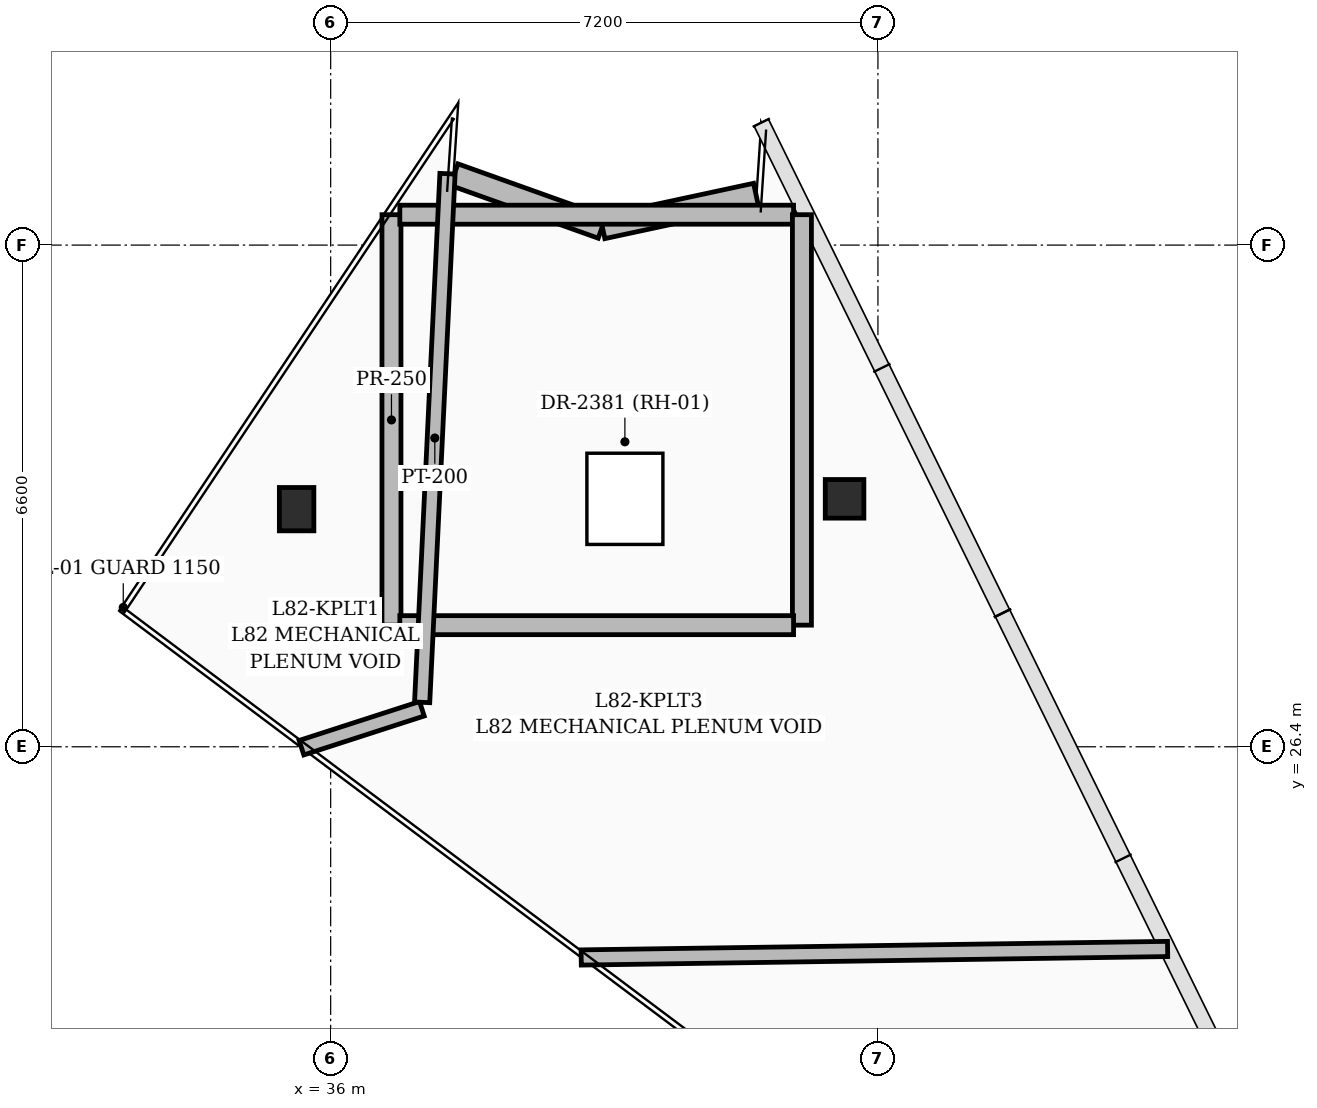
"""IFC4 building model, lengths in metres.
Left out: names, types, materials, properties, quantities, classifications, styles, units other than length and angle.
Written with IfcOpenShell. Run it as: python <this file> out.ifc"""

import sys

from ifc_helpers import new_model, si_unit, direction, frame, frame_2d, origin, origin_2d, place, context, subcontext, project, spatial, rectangle, hollow_circle, i_section, extrude, element, save


model = new_model("IFC4")
c1 = context("Model", 3, precision=1e-05, world=origin(), true_north=direction((0.0, 1.0)))
c2 = subcontext(c1, "Body", "Model", "MODEL_VIEW")
j1 = project(units=[si_unit("LENGTHUNIT", "METRE"), si_unit("PLANEANGLEUNIT", "RADIAN")], contexts=[c1])
p1 = place(None, origin())
s1 = spatial("IfcSite", under=j1, at=p1, CompositionType="ELEMENT")
p2 = place(p1, origin())
s2 = spatial("IfcBuilding", under=s1, at=p2, CompositionType="ELEMENT")
p3 = place(p2, frame((0.0, 0.0, 318.5)))
s3 = spatial("IfcBuildingStorey", under=s2, at=p3, CompositionType="ELEMENT", Elevation=318.5)
p4 = place(p3, frame((42.761, 29.662, 0.0), z_axis=(0.0, 0.0, 1.0), x_axis=(1.0, 0.0, 0.0)))
e1 = element("IfcColumn", 1, at=p4, inside=s3, PredefinedType="COLUMN", context=c2, shape_type="SweptSolid", body=[
    extrude(hollow_circle(Radius=0.254, WallThickness=0.016, at=origin_2d()), origin(), (0.0, 0.0, 1.0), 3.85),
])
p5 = place(p3, frame((35.552, 29.526, 0.0), z_axis=(0.0, 0.0, 1.0), x_axis=(1.0, 0.0, 0.0)))
e2 = element("IfcColumn", 2, at=p5, inside=s3, PredefinedType="COLUMN", context=c2, shape_type="SweptSolid", body=[
    extrude(i_section(OverallWidth=0.454, OverallDepth=0.57, WebThickness=0.078, FlangeThickness=0.094, FilletRadius=0.02, at=origin_2d()), origin(), (0.0, 0.0, 1.0), 2.823),
])
p6 = place(p3, frame((37.624, 33.927, 0.0), z_axis=(0.0, 0.0, 1.0), x_axis=(0.941672407687, -0.336530944493, 0.0)))
e3 = element("IfcWall", 3, at=p6, inside=s3, PredefinedType="SOLIDWALL", context=c2, shape_type="SweptSolid", body=[
    extrude(rectangle(XDim=2.067, YDim=0.3, at=frame_2d((1.033, 0.0))), origin(), (0.0, 0.0, 1.0), 3.6),
])
p7 = place(p3, frame((39.576, 33.232, 0.0), z_axis=(0.0, 0.0, 1.0), x_axis=(0.977608338725, 0.210432735227, 0.0)))
e4 = element("IfcWall", 4, at=p7, inside=s3, PredefinedType="SOLIDWALL", context=c2, shape_type="SweptSolid", body=[
    extrude(rectangle(XDim=2.066, YDim=0.3, at=frame_2d((1.033, 0.0))), origin(), (0.0, 0.0, 1.0), 3.6),
])
p8 = place(p3, frame((36.8, 28.0, 3.92), z_axis=(0.0, 0.0, 1.0), x_axis=(0.0, 1.0, 0.0)))
e5 = element("IfcWall", 5, at=p8, inside=s3, PredefinedType="PARAPET", context=c2, shape_type="SweptSolid", body=[
    extrude(rectangle(XDim=5.4, YDim=0.25, at=frame_2d((2.7, 0.0))), origin(), (0.0, 0.0, 1.0), 0.08),
])
p9 = place(p3, frame((36.91, 33.4, 3.92), z_axis=(0.0, 0.0, 1.0), x_axis=(1.0, 0.0, 0.0)))
e6 = element("IfcWall", 6, at=p9, inside=s3, PredefinedType="PARAPET", context=c2, shape_type="SweptSolid", body=[
    extrude(rectangle(XDim=5.18, YDim=0.25, at=frame_2d((2.59, 0.0))), origin(), (0.0, 0.0, 1.0), 0.08),
])
p10 = place(p3, frame((42.2, 33.4, 3.92), z_axis=(0.0, 0.0, 1.0), x_axis=(0.0, -1.0, 0.0)))
e7 = element("IfcWall", 7, at=p10, inside=s3, PredefinedType="PARAPET", context=c2, shape_type="SweptSolid", body=[
    extrude(rectangle(XDim=5.4, YDim=0.25, at=frame_2d((2.7, 0.0))), origin(), (0.0, 0.0, 1.0), 0.08),
])
p11 = place(p3, frame((42.09, 28.0, 3.92), z_axis=(0.0, 0.0, 1.0), x_axis=(-1.0, 0.0, 0.0)))
e8 = element("IfcWall", 8, at=p11, inside=s3, PredefinedType="PARAPET", context=c2, shape_type="SweptSolid", body=[
    extrude(rectangle(XDim=5.18, YDim=0.25, at=frame_2d((2.59, 0.0))), origin(), (0.0, 0.0, 1.0), 0.08),
])
p12 = place(p3, frame((35.616, 26.388, 0.0), z_axis=(0.0, 0.0, 1.0), x_axis=(0.951532911974, 0.307546935328, 0.0)))
e9 = element("IfcWall", 9, at=p12, inside=s3, PredefinedType="PARTITIONING", context=c2, shape_type="SweptSolid", body=[
    extrude(rectangle(XDim=1.665, YDim=0.2, at=frame_2d((0.832, 0.0))), origin(), (0.0, 0.0, 1.0), 3.68),
])
p13 = place(p3, frame((37.204, 26.985, 0.0), z_axis=(0.0, 0.0, 1.0), x_axis=(0.047901695933, 0.998852054874, 0.0)))
e10 = element("IfcWall", 10, at=p13, inside=s3, PredefinedType="PARTITIONING", context=c2, shape_type="SweptSolid", body=[
    extrude(rectangle(XDim=6.962, YDim=0.2, at=frame_2d((3.481, 0.0))), origin(), (0.0, 0.0, 1.0), 3.68),
])
p14 = place(p3, frame((39.296, 23.628, 0.0), z_axis=(0.0, 0.0, 1.0), x_axis=(0.999894530955, 0.014523324886, 0.0)))
e11 = element("IfcWall", 11, at=p14, inside=s3, PredefinedType="PARTITIONING", context=c2, shape_type="SweptSolid", body=[
    extrude(rectangle(XDim=7.716, YDim=0.2, at=frame_2d((3.858, 0.0))), origin(), (0.0, 0.0, 1.0), 3.68),
])
p15 = place(p3, frame((0.0, 0.0, -0.3)))
p16 = place(p15, frame((39.871, 29.662, 0.0)))
p17 = place(p16, frame((0.0, 0.0, 0.25)))
e12 = element("IfcDoor", 12, at=p17, inside=s3, OperationType="SINGLE_SWING_LEFT", PredefinedType="TRAPDOOR", context=c2, shape_type="SweptSolid", body=[
    extrude(rectangle(XDim=1.0, YDim=1.2, at=origin_2d()), origin(), (0.0, 0.0, 1.0), 0.05),
])
save(model, sys.argv[1])
